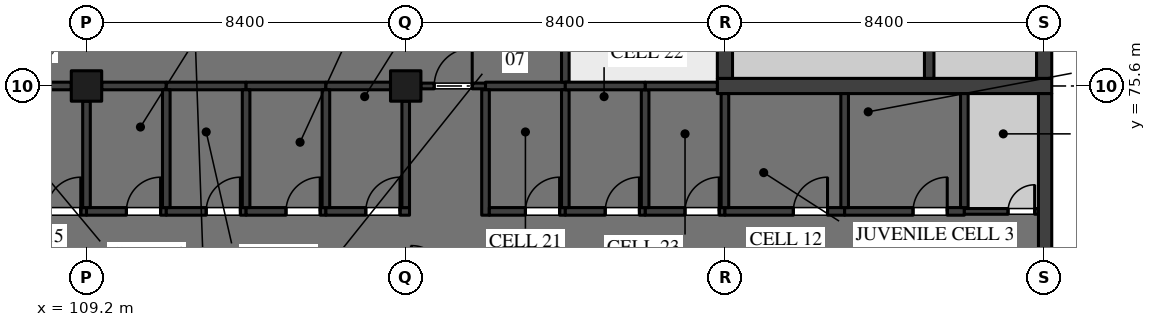
"""IFC4 building model, lengths in metres.
Left out: names, types, materials, properties, quantities, classifications, styles, units other than length and angle.
Written with IfcOpenShell. Run it as: python <this file> out.ifc"""

import sys

from ifc_helpers import new_model, si_unit, direction, frame, frame_2d, origin, origin_2d, place, context, subcontext, project, spatial, rectangle, extrude, element, fill, save


model = new_model("IFC4")
c1 = context("Model", 3, precision=1e-05, world=origin(), true_north=direction((0.0, 1.0)))
c2 = subcontext(c1, "Body", "Model", "MODEL_VIEW")
j1 = project(units=[si_unit("LENGTHUNIT", "METRE"), si_unit("PLANEANGLEUNIT", "RADIAN")], contexts=[c1])
p1 = place(None, origin())
s1 = spatial("IfcSite", under=j1, at=p1, CompositionType="ELEMENT")
p2 = place(p1, origin())
s2 = spatial("IfcBuilding", under=s1, at=p2, CompositionType="ELEMENT")
p3 = place(p2, origin())
s3 = spatial("IfcBuildingStorey", under=s2, at=p3, CompositionType="ELEMENT", Elevation=0.0)
for number, where, z_axis, x_axis in (
    (1, (109.2, 75.6, 0.0), (0.0, 0.0, 1.0), (1.0, 0.0, 0.0)),
    (2, (117.6, 75.6, 0.0), (0.0, 0.0, 1.0), (1.0, 0.0, 0.0)),
):
    element("IfcColumn", number, at=place(p3, frame(where, z_axis=z_axis, x_axis=x_axis)), inside=s3, PredefinedType="COLUMN", context=c2, shape_type="SweptSolid", body=[
        extrude(rectangle(XDim=0.8, YDim=0.8, at=origin_2d()), origin(), (0.0, 0.0, 1.0), 5.05),
    ])
p4 = place(p3, frame((125.8, 75.6, 0.0), z_axis=(0.0, 0.0, 1.0), x_axis=(1.0, 0.0, 0.0)))
e3 = element("IfcWall", 3, at=p4, inside=s3, PredefinedType="SHEAR", context=c2, shape_type="SweptSolid", body=[
    extrude(rectangle(XDim=8.8, YDim=0.4, at=frame_2d((4.4, 0.0))), origin(), (0.0, 0.0, 1.0), 5.05),
])
p5 = place(p3, frame((126.0, 75.8, 0.0), z_axis=(0.0, 0.0, 1.0), x_axis=(0.0, 1.0, 0.0)))
e4 = element("IfcWall", 4, at=p5, inside=s3, PredefinedType="SHEAR", context=c2, shape_type="SweptSolid", body=[
    extrude(rectangle(XDim=8.0, YDim=0.4, at=frame_2d((4.0, 0.0))), origin(), (0.0, 0.0, 1.0), 5.05),
])
p6 = place(p5, frame((6.2, 0.0, 0.0)))
e5 = element("IfcOpeningElement", 5, at=p6, cuts=e4, PredefinedType="OPENING", context=c2, shape_type="SweptSolid", body=[
    extrude(rectangle(XDim=1.2, YDim=2.1, at=frame_2d((0.6, 1.05))), frame((0.0, 0.21, 0.0), z_axis=(0.0, -1.0, 0.0), x_axis=(1.0, 0.0, 0.0)), (0.0, 0.0, 1.0), 0.42),
])
p7 = place(p3, frame((134.4, 75.8, 0.0), z_axis=(0.0, 0.0, 1.0), x_axis=(0.0, 1.0, 0.0)))
e6 = element("IfcWall", 6, at=p7, inside=s3, PredefinedType="SHEAR", context=c2, shape_type="SweptSolid", body=[
    extrude(rectangle(XDim=8.0, YDim=0.4, at=frame_2d((4.0, 0.0))), origin(), (0.0, 0.0, 1.0), 5.05),
])
p8 = place(p7, frame((6.65, 0.0, 0.0)))
e7 = element("IfcOpeningElement", 7, at=p8, cuts=e6, PredefinedType="OPENING", context=c2, shape_type="SweptSolid", body=[
    extrude(rectangle(XDim=1.2, YDim=2.1, at=frame_2d((0.6, 1.05))), frame((0.0, 0.21, 0.0), z_axis=(0.0, -1.0, 0.0), x_axis=(1.0, 0.0, 0.0)), (0.0, 0.0, 1.0), 0.42),
])
p9 = place(p3, frame((131.375, 83.8, 0.0), z_axis=(0.0, 0.0, 1.0), x_axis=(0.0, -1.0, 0.0)))
e8 = element("IfcWall", 8, at=p9, inside=s3, PredefinedType="SOLIDWALL", context=c2, shape_type="SweptSolid", body=[
    extrude(rectangle(XDim=8.0, YDim=0.25, at=frame_2d((4.0, 0.0))), origin(), (0.0, 0.0, 1.0), 5.05),
])
p10 = place(p9, frame((0.2, 0.0, 0.0)))
e9 = element("IfcOpeningElement", 9, at=p10, cuts=e8, PredefinedType="OPENING", context=c2, shape_type="SweptSolid", body=[
    extrude(rectangle(XDim=1.1, YDim=2.1, at=frame_2d((0.55, 1.05))), frame((0.0, 0.135, 0.0), z_axis=(0.0, -1.0, 0.0), x_axis=(1.0, 0.0, 0.0)), (0.0, 0.0, 1.0), 0.27),
])
p11 = place(p3, frame((118.0, 75.6, 0.0), z_axis=(0.0, 0.0, 1.0), x_axis=(1.0, 0.0, 0.0)))
e10 = element("IfcWall", 10, at=p11, inside=s3, PredefinedType="PARTITIONING", context=c2, shape_type="SweptSolid", body=[
    extrude(rectangle(XDim=1.7, YDim=0.15, at=frame_2d((0.85, 0.0))), origin(), (0.0, 0.0, 1.0), 5.05),
])
p12 = place(p11, frame((0.35, 0.0, 0.0)))
e11 = element("IfcOpeningElement", 11, at=p12, cuts=e10, PredefinedType="OPENING", context=c2, shape_type="SweptSolid", body=[
    extrude(rectangle(XDim=1.0, YDim=2.4, at=frame_2d((0.5, 1.2))), frame((0.0, 0.085, 0.0), z_axis=(0.0, -1.0, 0.0), x_axis=(1.0, 0.0, 0.0)), (0.0, 0.0, 1.0), 0.17),
])
for number, where, z_axis, x_axis in (
    (12, (107.1, 75.6, 0.0), (0.0, 0.0, 1.0), (1.0, 0.0, 0.0)),
    (13, (109.6, 75.6, 0.0), (0.0, 0.0, 1.0), (1.0, 0.0, 0.0)),
):
    element("IfcWall", number, at=place(p3, frame(where, z_axis=z_axis, x_axis=x_axis)), inside=s3, PredefinedType="PARTITIONING", context=c2, shape_type="SweptSolid", body=[
        extrude(rectangle(XDim=1.7, YDim=0.2, at=frame_2d((0.85, 0.0))), origin(), (0.0, 0.0, 1.0), 5.05),
    ])
p13 = place(p3, frame((111.3, 75.6, 0.0), z_axis=(0.0, 0.0, 1.0), x_axis=(1.0, 0.0, 0.0)))
e14 = element("IfcWall", 14, at=p13, inside=s3, PredefinedType="PARTITIONING", context=c2, shape_type="SweptSolid", body=[
    extrude(rectangle(XDim=2.1, YDim=0.2, at=frame_2d((1.05, 0.0))), origin(), (0.0, 0.0, 1.0), 5.05),
])
p14 = place(p3, frame((113.4, 75.6, 0.0), z_axis=(0.0, 0.0, 1.0), x_axis=(1.0, 0.0, 0.0)))
e15 = element("IfcWall", 15, at=p14, inside=s3, PredefinedType="PARTITIONING", context=c2, shape_type="SweptSolid", body=[
    extrude(rectangle(XDim=2.1, YDim=0.2, at=frame_2d((1.05, 0.0))), origin(), (0.0, 0.0, 1.0), 5.05),
])
p15 = place(p3, frame((115.5, 75.6, 0.0), z_axis=(0.0, 0.0, 1.0), x_axis=(1.0, 0.0, 0.0)))
e16 = element("IfcWall", 16, at=p15, inside=s3, PredefinedType="PARTITIONING", context=c2, shape_type="SweptSolid", body=[
    extrude(rectangle(XDim=1.7, YDim=0.2, at=frame_2d((0.85, 0.0))), origin(), (0.0, 0.0, 1.0), 5.05),
])
p16 = place(p3, frame((119.7, 75.6, 0.0), z_axis=(0.0, 0.0, 1.0), x_axis=(1.0, 0.0, 0.0)))
e17 = element("IfcWall", 17, at=p16, inside=s3, PredefinedType="PARTITIONING", context=c2, shape_type="SweptSolid", body=[
    extrude(rectangle(XDim=2.1, YDim=0.2, at=frame_2d((1.05, 0.0))), origin(), (0.0, 0.0, 1.0), 5.05),
])
p17 = place(p3, frame((121.8, 75.7, 0.0), z_axis=(0.0, 0.0, 1.0), x_axis=(0.0, 1.0, 0.0)))
e18 = element("IfcWall", 18, at=p17, inside=s3, PredefinedType="PARTITIONING", context=c2, shape_type="SweptSolid", body=[
    extrude(rectangle(XDim=8.3, YDim=0.2, at=frame_2d((4.15, 0.0))), origin(), (0.0, 0.0, 1.0), 5.05),
])
p18 = place(p3, frame((123.9, 72.3, 0.0), z_axis=(0.0, 0.0, 1.0), x_axis=(1.0, 0.0, 0.0)))
e19 = element("IfcWall", 19, at=p18, inside=s3, PredefinedType="PARTITIONING", context=c2, shape_type="SweptSolid", body=[
    extrude(rectangle(XDim=2.1, YDim=0.2, at=frame_2d((1.05, 0.0))), origin(), (0.0, 0.0, 1.0), 5.05),
])
p19 = place(p18, frame((1.05, 0.0, 0.0)))
e20 = element("IfcOpeningElement", 20, at=p19, cuts=e19, PredefinedType="OPENING", context=c2, shape_type="SweptSolid", body=[
    extrude(rectangle(XDim=0.9, YDim=2.1, at=frame_2d((0.45, 1.05))), frame((0.0, 0.11, 0.0), z_axis=(0.0, -1.0, 0.0), x_axis=(1.0, 0.0, 0.0)), (0.0, 0.0, 1.0), 0.22),
])
p20 = place(p3, frame((107.1, 72.3, 0.0), z_axis=(0.0, 0.0, 1.0), x_axis=(1.0, 0.0, 0.0)))
e21 = element("IfcWall", 21, at=p20, inside=s3, PredefinedType="PARTITIONING", context=c2, shape_type="SweptSolid", body=[
    extrude(rectangle(XDim=2.1, YDim=0.2, at=frame_2d((1.05, 0.0))), origin(), (0.0, 0.0, 1.0), 5.05),
])
p21 = place(p20, frame((1.05, 0.0, 0.0)))
e22 = element("IfcOpeningElement", 22, at=p21, cuts=e21, PredefinedType="OPENING", context=c2, shape_type="SweptSolid", body=[
    extrude(rectangle(XDim=0.9, YDim=2.1, at=frame_2d((0.45, 1.05))), frame((0.0, 0.11, 0.0), z_axis=(0.0, -1.0, 0.0), x_axis=(1.0, 0.0, 0.0)), (0.0, 0.0, 1.0), 0.22),
])
p22 = place(p3, frame((109.2, 72.3, 0.0), z_axis=(0.0, 0.0, 1.0), x_axis=(1.0, 0.0, 0.0)))
e23 = element("IfcWall", 23, at=p22, inside=s3, PredefinedType="PARTITIONING", context=c2, shape_type="SweptSolid", body=[
    extrude(rectangle(XDim=2.1, YDim=0.2, at=frame_2d((1.05, 0.0))), origin(), (0.0, 0.0, 1.0), 5.05),
])
p23 = place(p22, frame((1.05, 0.0, 0.0)))
e24 = element("IfcOpeningElement", 24, at=p23, cuts=e23, PredefinedType="OPENING", context=c2, shape_type="SweptSolid", body=[
    extrude(rectangle(XDim=0.9, YDim=2.1, at=frame_2d((0.45, 1.05))), frame((0.0, 0.11, 0.0), z_axis=(0.0, -1.0, 0.0), x_axis=(1.0, 0.0, 0.0)), (0.0, 0.0, 1.0), 0.22),
])
p24 = place(p3, frame((111.3, 72.3, 0.0), z_axis=(0.0, 0.0, 1.0), x_axis=(1.0, 0.0, 0.0)))
e25 = element("IfcWall", 25, at=p24, inside=s3, PredefinedType="PARTITIONING", context=c2, shape_type="SweptSolid", body=[
    extrude(rectangle(XDim=2.1, YDim=0.2, at=frame_2d((1.05, 0.0))), origin(), (0.0, 0.0, 1.0), 5.05),
])
p25 = place(p24, frame((1.05, 0.0, 0.0)))
e26 = element("IfcOpeningElement", 26, at=p25, cuts=e25, PredefinedType="OPENING", context=c2, shape_type="SweptSolid", body=[
    extrude(rectangle(XDim=0.9, YDim=2.1, at=frame_2d((0.45, 1.05))), frame((0.0, 0.11, 0.0), z_axis=(0.0, -1.0, 0.0), x_axis=(1.0, 0.0, 0.0)), (0.0, 0.0, 1.0), 0.22),
])
p26 = place(p3, frame((113.4, 72.3, 0.0), z_axis=(0.0, 0.0, 1.0), x_axis=(1.0, 0.0, 0.0)))
e27 = element("IfcWall", 27, at=p26, inside=s3, PredefinedType="PARTITIONING", context=c2, shape_type="SweptSolid", body=[
    extrude(rectangle(XDim=2.1, YDim=0.2, at=frame_2d((1.05, 0.0))), origin(), (0.0, 0.0, 1.0), 5.05),
])
p27 = place(p26, frame((1.05, 0.0, 0.0)))
e28 = element("IfcOpeningElement", 28, at=p27, cuts=e27, PredefinedType="OPENING", context=c2, shape_type="SweptSolid", body=[
    extrude(rectangle(XDim=0.9, YDim=2.1, at=frame_2d((0.45, 1.05))), frame((0.0, 0.11, 0.0), z_axis=(0.0, -1.0, 0.0), x_axis=(1.0, 0.0, 0.0)), (0.0, 0.0, 1.0), 0.22),
])
p28 = place(p3, frame((115.5, 72.3, 0.0), z_axis=(0.0, 0.0, 1.0), x_axis=(1.0, 0.0, 0.0)))
e29 = element("IfcWall", 29, at=p28, inside=s3, PredefinedType="PARTITIONING", context=c2, shape_type="SweptSolid", body=[
    extrude(rectangle(XDim=2.2, YDim=0.2, at=frame_2d((1.1, 0.0))), origin(), (0.0, 0.0, 1.0), 5.05),
])
p29 = place(p28, frame((1.05, 0.0, 0.0)))
e30 = element("IfcOpeningElement", 30, at=p29, cuts=e29, PredefinedType="OPENING", context=c2, shape_type="SweptSolid", body=[
    extrude(rectangle(XDim=0.9, YDim=2.1, at=frame_2d((0.45, 1.05))), frame((0.0, 0.11, 0.0), z_axis=(0.0, -1.0, 0.0), x_axis=(1.0, 0.0, 0.0)), (0.0, 0.0, 1.0), 0.22),
])
p30 = place(p3, frame((117.6, 72.4, 0.0), z_axis=(0.0, 0.0, 1.0), x_axis=(0.0, 1.0, 0.0)))
e31 = element("IfcWall", 31, at=p30, inside=s3, PredefinedType="PARTITIONING", context=c2, shape_type="SweptSolid", body=[
    extrude(rectangle(XDim=2.8, YDim=0.2, at=frame_2d((1.4, 0.0))), origin(), (0.0, 0.0, 1.0), 5.05),
])
p31 = place(p3, frame((119.7, 72.2, 0.0), z_axis=(0.0, 0.0, 1.0), x_axis=(0.0, 1.0, 0.0)))
e32 = element("IfcWall", 32, at=p31, inside=s3, PredefinedType="PARTITIONING", context=c2, shape_type="SweptSolid", body=[
    extrude(rectangle(XDim=3.3, YDim=0.2, at=frame_2d((1.65, 0.0))), origin(), (0.0, 0.0, 1.0), 5.05),
])
p32 = place(p3, frame((119.8, 72.3, 0.0), z_axis=(0.0, 0.0, 1.0), x_axis=(1.0, 0.0, 0.0)))
e33 = element("IfcWall", 33, at=p32, inside=s3, PredefinedType="PARTITIONING", context=c2, shape_type="SweptSolid", body=[
    extrude(rectangle(XDim=2.0, YDim=0.2, at=frame_2d((1.0, 0.0))), origin(), (0.0, 0.0, 1.0), 5.05),
])
p33 = place(p32, frame((0.95, 0.0, 0.0)))
e34 = element("IfcOpeningElement", 34, at=p33, cuts=e33, PredefinedType="OPENING", context=c2, shape_type="SweptSolid", body=[
    extrude(rectangle(XDim=0.9, YDim=2.1, at=frame_2d((0.45, 1.05))), frame((0.0, 0.11, 0.0), z_axis=(0.0, -1.0, 0.0), x_axis=(1.0, 0.0, 0.0)), (0.0, 0.0, 1.0), 0.22),
])
p34 = place(p3, frame((121.8, 72.3, 0.0), z_axis=(0.0, 0.0, 1.0), x_axis=(1.0, 0.0, 0.0)))
e35 = element("IfcWall", 35, at=p34, inside=s3, PredefinedType="PARTITIONING", context=c2, shape_type="SweptSolid", body=[
    extrude(rectangle(XDim=2.1, YDim=0.2, at=frame_2d((1.05, 0.0))), origin(), (0.0, 0.0, 1.0), 5.05),
])
p35 = place(p34, frame((1.05, 0.0, 0.0)))
e36 = element("IfcOpeningElement", 36, at=p35, cuts=e35, PredefinedType="OPENING", context=c2, shape_type="SweptSolid", body=[
    extrude(rectangle(XDim=0.9, YDim=2.1, at=frame_2d((0.45, 1.05))), frame((0.0, 0.11, 0.0), z_axis=(0.0, -1.0, 0.0), x_axis=(1.0, 0.0, 0.0)), (0.0, 0.0, 1.0), 0.22),
])
p36 = place(p3, frame((126.0, 72.3, 0.0), z_axis=(0.0, 0.0, 1.0), x_axis=(1.0, 0.0, 0.0)))
e37 = element("IfcWall", 37, at=p36, inside=s3, PredefinedType="PARTITIONING", context=c2, shape_type="SweptSolid", body=[
    extrude(rectangle(XDim=3.15, YDim=0.2, at=frame_2d((1.575, 0.0))), origin(), (0.0, 0.0, 1.0), 5.05),
])
p37 = place(p36, frame((1.8, 0.0, 0.0)))
e38 = element("IfcOpeningElement", 38, at=p37, cuts=e37, PredefinedType="OPENING", context=c2, shape_type="SweptSolid", body=[
    extrude(rectangle(XDim=0.9, YDim=2.1, at=frame_2d((0.45, 1.05))), frame((0.0, 0.11, 0.0), z_axis=(0.0, -1.0, 0.0), x_axis=(1.0, 0.0, 0.0)), (0.0, 0.0, 1.0), 0.22),
])
p38 = place(p3, frame((129.15, 72.3, 0.0), z_axis=(0.0, 0.0, 1.0), x_axis=(1.0, 0.0, 0.0)))
e39 = element("IfcWall", 39, at=p38, inside=s3, PredefinedType="PARTITIONING", context=c2, shape_type="SweptSolid", body=[
    extrude(rectangle(XDim=3.15, YDim=0.2, at=frame_2d((1.575, 0.0))), origin(), (0.0, 0.0, 1.0), 5.05),
])
p39 = place(p38, frame((1.8, 0.0, 0.0)))
e40 = element("IfcOpeningElement", 40, at=p39, cuts=e39, PredefinedType="OPENING", context=c2, shape_type="SweptSolid", body=[
    extrude(rectangle(XDim=0.9, YDim=2.1, at=frame_2d((0.45, 1.05))), frame((0.0, 0.11, 0.0), z_axis=(0.0, -1.0, 0.0), x_axis=(1.0, 0.0, 0.0)), (0.0, 0.0, 1.0), 0.22),
])
p40 = place(p3, frame((132.3, 72.3, 0.0), z_axis=(0.0, 0.0, 1.0), x_axis=(1.0, 0.0, 0.0)))
e41 = element("IfcWall", 41, at=p40, inside=s3, PredefinedType="PARTITIONING", context=c2, shape_type="SweptSolid", body=[
    extrude(rectangle(XDim=1.95, YDim=0.15, at=frame_2d((0.975, 0.0))), origin(), (0.0, 0.0, 1.0), 5.05),
])
p41 = place(p40, frame((1.15, 0.0, 0.0)))
e42 = element("IfcOpeningElement", 42, at=p41, cuts=e41, PredefinedType="OPENING", context=c2, shape_type="SweptSolid", body=[
    extrude(rectangle(XDim=0.7, YDim=2.1, at=frame_2d((0.35, 1.05))), frame((0.0, 0.085, 0.0), z_axis=(0.0, -1.0, 0.0), x_axis=(1.0, 0.0, 0.0)), (0.0, 0.0, 1.0), 0.17),
])
p42 = place(p3, frame((123.9, 72.4, 0.0), z_axis=(0.0, 0.0, 1.0), x_axis=(0.0, 1.0, 0.0)))
e43 = element("IfcWall", 43, at=p42, inside=s3, PredefinedType="PARTITIONING", context=c2, shape_type="SweptSolid", body=[
    extrude(rectangle(XDim=3.1, YDim=0.2, at=frame_2d((1.55, 0.0))), origin(), (0.0, 0.0, 1.0), 5.05),
])
p43 = place(p3, frame((126.0, 72.4, 0.0), z_axis=(0.0, 0.0, 1.0), x_axis=(0.0, 1.0, 0.0)))
e44 = element("IfcWall", 44, at=p43, inside=s3, PredefinedType="PARTITIONING", context=c2, shape_type="SweptSolid", body=[
    extrude(rectangle(XDim=3.0, YDim=0.2, at=frame_2d((1.5, 0.0))), origin(), (0.0, 0.0, 1.0), 5.05),
])
p44 = place(p3, frame((123.9, 75.6, 0.0), z_axis=(0.0, 0.0, 1.0), x_axis=(1.0, 0.0, 0.0)))
e45 = element("IfcWall", 45, at=p44, inside=s3, PredefinedType="PARTITIONING", context=c2, shape_type="SweptSolid", body=[
    extrude(rectangle(XDim=1.9, YDim=0.2, at=frame_2d((0.95, 0.0))), origin(), (0.0, 0.0, 1.0), 5.05),
])
p45 = place(p3, frame((109.2, 72.4, 0.0), z_axis=(0.0, 0.0, 1.0), x_axis=(0.0, 1.0, 0.0)))
e46 = element("IfcWall", 46, at=p45, inside=s3, PredefinedType="PARTITIONING", context=c2, shape_type="SweptSolid", body=[
    extrude(rectangle(XDim=2.8, YDim=0.2, at=frame_2d((1.4, 0.0))), origin(), (0.0, 0.0, 1.0), 5.05),
])
for number, where, z_axis, x_axis in (
    (47, (111.3, 72.4, 0.0), (0.0, 0.0, 1.0), (0.0, 1.0, 0.0)),
    (48, (113.4, 72.4, 0.0), (0.0, 0.0, 1.0), (0.0, 1.0, 0.0)),
    (49, (115.5, 72.4, 0.0), (0.0, 0.0, 1.0), (0.0, 1.0, 0.0)),
    (50, (121.8, 72.4, 0.0), (0.0, 0.0, 1.0), (0.0, 1.0, 0.0)),
):
    element("IfcWall", number, at=place(p3, frame(where, z_axis=z_axis, x_axis=x_axis)), inside=s3, PredefinedType="PARTITIONING", context=c2, shape_type="SweptSolid", body=[
        extrude(rectangle(XDim=3.1, YDim=0.2, at=frame_2d((1.55, 0.0))), origin(), (0.0, 0.0, 1.0), 5.05),
    ])
p46 = place(p3, frame((121.8, 75.6, 0.0), z_axis=(0.0, 0.0, 1.0), x_axis=(1.0, 0.0, 0.0)))
e51 = element("IfcWall", 51, at=p46, inside=s3, PredefinedType="PARTITIONING", context=c2, shape_type="SweptSolid", body=[
    extrude(rectangle(XDim=2.1, YDim=0.2, at=frame_2d((1.05, 0.0))), origin(), (0.0, 0.0, 1.0), 5.05),
])
for number, where, z_axis, x_axis in (
    (52, (129.15, 72.4, 0.0), (0.0, 0.0, 1.0), (0.0, 1.0, 0.0)),
    (53, (132.3, 72.4, 0.0), (0.0, 0.0, 1.0), (0.0, 1.0, 0.0)),
):
    element("IfcWall", number, at=place(p3, frame(where, z_axis=z_axis, x_axis=x_axis)), inside=s3, PredefinedType="PARTITIONING", context=c2, shape_type="SweptSolid", body=[
        extrude(rectangle(XDim=3.0, YDim=0.2, at=frame_2d((1.5, 0.0))), origin(), (0.0, 0.0, 1.0), 5.05),
    ])
p47 = place(p3, frame((134.425, 67.58, 0.0), z_axis=(0.0, 0.0, 1.0), x_axis=(0.0, 1.0, 0.0)))
e54 = element("IfcWall", 54, at=p47, inside=s3, PredefinedType="SOLIDWALL", context=c2, shape_type="SweptSolid", body=[
    extrude(rectangle(XDim=7.82, YDim=0.35, at=frame_2d((3.91, 0.0))), origin(), (0.0, 0.0, 1.0), 5.05),
])
p48 = place(p12, origin())
e55 = element("IfcDoor", 55, at=p48, inside=s3, OperationType="SINGLE_SWING_LEFT", PredefinedType="DOOR", context=c2, shape_type="SweptSolid", body=[
    extrude(rectangle(XDim=1.0, YDim=2.4, at=frame_2d((0.5, 1.2))), frame((0.0, 0.025, 0.0), z_axis=(0.0, -1.0, 0.0), x_axis=(1.0, 0.0, 0.0)), (0.0, 0.0, 1.0), 0.05),
])
fill(e11, e55)
p49 = place(p19, origin())
e56 = element("IfcDoor", 56, at=p49, inside=s3, OperationType="SINGLE_SWING_LEFT", PredefinedType="DOOR", context=c2, shape_type="SweptSolid", body=[
    extrude(rectangle(XDim=0.9, YDim=2.1, at=frame_2d((0.45, 1.05))), frame((0.0, 0.04, 0.0), z_axis=(0.0, -1.0, 0.0), x_axis=(1.0, 0.0, 0.0)), (0.0, 0.0, 1.0), 0.08),
])
fill(e20, e56)
p50 = place(p21, origin())
e57 = element("IfcDoor", 57, at=p50, inside=s3, OperationType="SINGLE_SWING_LEFT", PredefinedType="DOOR", context=c2, shape_type="SweptSolid", body=[
    extrude(rectangle(XDim=0.9, YDim=2.1, at=frame_2d((0.45, 1.05))), frame((0.0, 0.04, 0.0), z_axis=(0.0, -1.0, 0.0), x_axis=(1.0, 0.0, 0.0)), (0.0, 0.0, 1.0), 0.08),
])
fill(e22, e57)
p51 = place(p23, origin())
e58 = element("IfcDoor", 58, at=p51, inside=s3, OperationType="SINGLE_SWING_LEFT", PredefinedType="DOOR", context=c2, shape_type="SweptSolid", body=[
    extrude(rectangle(XDim=0.9, YDim=2.1, at=frame_2d((0.45, 1.05))), frame((0.0, 0.04, 0.0), z_axis=(0.0, -1.0, 0.0), x_axis=(1.0, 0.0, 0.0)), (0.0, 0.0, 1.0), 0.08),
])
fill(e24, e58)
p52 = place(p25, origin())
e59 = element("IfcDoor", 59, at=p52, inside=s3, OperationType="SINGLE_SWING_LEFT", PredefinedType="DOOR", context=c2, shape_type="SweptSolid", body=[
    extrude(rectangle(XDim=0.9, YDim=2.1, at=frame_2d((0.45, 1.05))), frame((0.0, 0.04, 0.0), z_axis=(0.0, -1.0, 0.0), x_axis=(1.0, 0.0, 0.0)), (0.0, 0.0, 1.0), 0.08),
])
fill(e26, e59)
p53 = place(p27, origin())
e60 = element("IfcDoor", 60, at=p53, inside=s3, OperationType="SINGLE_SWING_LEFT", PredefinedType="DOOR", context=c2, shape_type="SweptSolid", body=[
    extrude(rectangle(XDim=0.9, YDim=2.1, at=frame_2d((0.45, 1.05))), frame((0.0, 0.04, 0.0), z_axis=(0.0, -1.0, 0.0), x_axis=(1.0, 0.0, 0.0)), (0.0, 0.0, 1.0), 0.08),
])
fill(e28, e60)
p54 = place(p29, origin())
e61 = element("IfcDoor", 61, at=p54, inside=s3, OperationType="SINGLE_SWING_LEFT", PredefinedType="DOOR", context=c2, shape_type="SweptSolid", body=[
    extrude(rectangle(XDim=0.9, YDim=2.1, at=frame_2d((0.45, 1.05))), frame((0.0, 0.04, 0.0), z_axis=(0.0, -1.0, 0.0), x_axis=(1.0, 0.0, 0.0)), (0.0, 0.0, 1.0), 0.08),
])
fill(e30, e61)
p55 = place(p33, origin())
e62 = element("IfcDoor", 62, at=p55, inside=s3, OperationType="SINGLE_SWING_LEFT", PredefinedType="DOOR", context=c2, shape_type="SweptSolid", body=[
    extrude(rectangle(XDim=0.9, YDim=2.1, at=frame_2d((0.45, 1.05))), frame((0.0, 0.04, 0.0), z_axis=(0.0, -1.0, 0.0), x_axis=(1.0, 0.0, 0.0)), (0.0, 0.0, 1.0), 0.08),
])
fill(e34, e62)
p56 = place(p35, origin())
e63 = element("IfcDoor", 63, at=p56, inside=s3, OperationType="SINGLE_SWING_LEFT", PredefinedType="DOOR", context=c2, shape_type="SweptSolid", body=[
    extrude(rectangle(XDim=0.9, YDim=2.1, at=frame_2d((0.45, 1.05))), frame((0.0, 0.04, 0.0), z_axis=(0.0, -1.0, 0.0), x_axis=(1.0, 0.0, 0.0)), (0.0, 0.0, 1.0), 0.08),
])
fill(e36, e63)
p57 = place(p37, origin())
e64 = element("IfcDoor", 64, at=p57, inside=s3, OperationType="SINGLE_SWING_LEFT", PredefinedType="DOOR", context=c2, shape_type="SweptSolid", body=[
    extrude(rectangle(XDim=0.9, YDim=2.1, at=frame_2d((0.45, 1.05))), frame((0.0, 0.04, 0.0), z_axis=(0.0, -1.0, 0.0), x_axis=(1.0, 0.0, 0.0)), (0.0, 0.0, 1.0), 0.08),
])
fill(e38, e64)
p58 = place(p39, origin())
e65 = element("IfcDoor", 65, at=p58, inside=s3, OperationType="SINGLE_SWING_LEFT", PredefinedType="DOOR", context=c2, shape_type="SweptSolid", body=[
    extrude(rectangle(XDim=0.9, YDim=2.1, at=frame_2d((0.45, 1.05))), frame((0.0, 0.04, 0.0), z_axis=(0.0, -1.0, 0.0), x_axis=(1.0, 0.0, 0.0)), (0.0, 0.0, 1.0), 0.08),
])
fill(e40, e65)
p59 = place(p41, origin())
e66 = element("IfcDoor", 66, at=p59, inside=s3, OperationType="SINGLE_SWING_LEFT", PredefinedType="DOOR", context=c2, shape_type="SweptSolid", body=[
    extrude(rectangle(XDim=0.7, YDim=2.1, at=frame_2d((0.35, 1.05))), frame((0.0, 0.025, 0.0), z_axis=(0.0, -1.0, 0.0), x_axis=(1.0, 0.0, 0.0)), (0.0, 0.0, 1.0), 0.05),
])
fill(e42, e66)
save(model, sys.argv[1])
